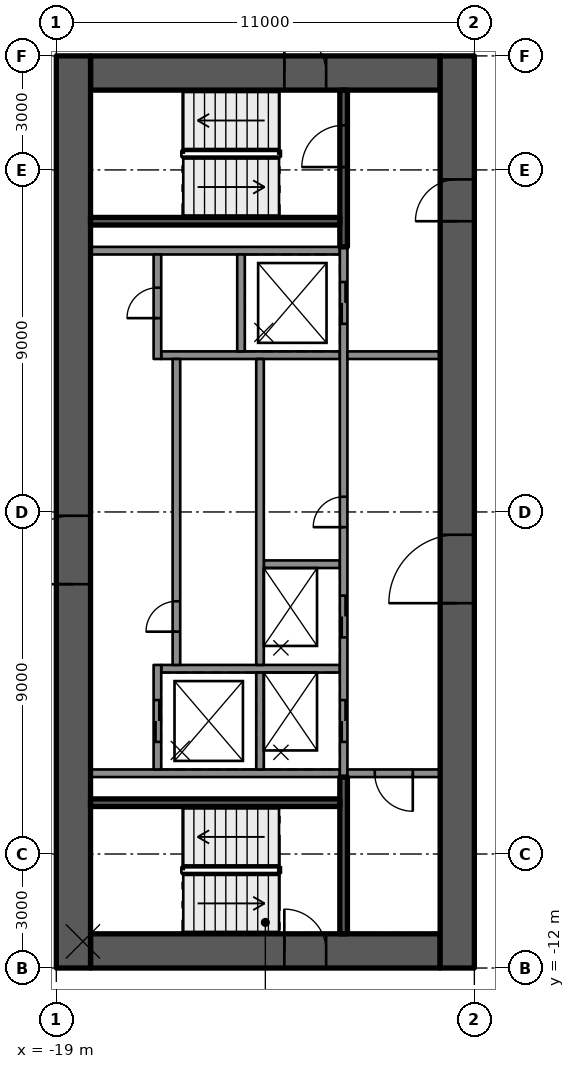
"""IFC4 building model, lengths in metres.
Left out: names, types, materials, properties, quantities, classifications, styles, units other than length and angle.
Written with IfcOpenShell. Run it as: python <this file> out.ifc"""

import sys

from ifc_helpers import new_model, si_unit, direction, frame, frame_2d, origin, place, context, subcontext, project, spatial, rectangle, extrude, element, fill, save


model = new_model("IFC4")
c1 = context("Model", 3, precision=1e-05, world=origin(), true_north=direction((0.0, 1.0)))
c2 = subcontext(c1, "Body", "Model", "MODEL_VIEW")
j1 = project(units=[si_unit("LENGTHUNIT", "METRE"), si_unit("PLANEANGLEUNIT", "RADIAN")], contexts=[c1])
p1 = place(None, origin())
s1 = spatial("IfcSite", under=j1, at=p1, CompositionType="ELEMENT")
p2 = place(p1, origin())
s2 = spatial("IfcBuilding", under=s1, at=p2, CompositionType="ELEMENT")
p3 = place(p2, frame((0.0, 0.0, 292.9)))
s3 = spatial("IfcBuildingStorey", under=s2, at=p3, CompositionType="ELEMENT", Elevation=292.9)
p4 = place(p3, frame((-18.1, 11.55, 0.0), z_axis=(0.0, 0.0, 1.0), x_axis=(1.0, 0.0, 0.0)))
e1 = element("IfcWall", 1, at=p4, inside=s3, PredefinedType="SHEAR", context=c2, shape_type="SweptSolid", body=[
    extrude(rectangle(XDim=9.2, YDim=0.9, at=frame_2d((4.6, 0.0))), origin(), (0.0, 0.0, 1.0), 3.5),
])
p5 = place(p4, frame((5.1, 0.0, 0.0)))
e2 = element("IfcOpeningElement", 2, at=p5, cuts=e1, PredefinedType="OPENING", context=c2, shape_type="SweptSolid", body=[
    extrude(rectangle(XDim=1.1, YDim=2.1, at=frame_2d((0.55, 1.05))), frame((0.0, 0.46, 0.0), z_axis=(0.0, -1.0, 0.0), x_axis=(1.0, 0.0, 0.0)), (0.0, 0.0, 1.0), 0.92),
])
p6 = place(p3, frame((-18.1, -11.55, 0.0), z_axis=(0.0, 0.0, 1.0), x_axis=(1.0, 0.0, 0.0)))
e3 = element("IfcWall", 3, at=p6, inside=s3, PredefinedType="SHEAR", context=c2, shape_type="SweptSolid", body=[
    extrude(rectangle(XDim=9.2, YDim=0.9, at=frame_2d((4.6, 0.0))), origin(), (0.0, 0.0, 1.0), 3.5),
])
p7 = place(p6, frame((5.1, 0.0, 0.0)))
e4 = element("IfcOpeningElement", 4, at=p7, cuts=e3, PredefinedType="OPENING", context=c2, shape_type="SweptSolid", body=[
    extrude(rectangle(XDim=1.1, YDim=2.1, at=frame_2d((0.55, 1.05))), frame((0.0, 0.46, 0.0), z_axis=(0.0, -1.0, 0.0), x_axis=(1.0, 0.0, 0.0)), (0.0, 0.0, 1.0), 0.92),
])
p8 = place(p3, frame((-18.55, -12.0, 0.0), z_axis=(0.0, 0.0, 1.0), x_axis=(0.0, 1.0, 0.0)))
e5 = element("IfcWall", 5, at=p8, inside=s3, PredefinedType="SHEAR", context=c2, shape_type="SweptSolid", body=[
    extrude(rectangle(XDim=24.0, YDim=0.9, at=frame_2d((12.0, 0.0))), origin(), (0.0, 0.0, 1.0), 3.5),
])
p9 = place(p8, frame((10.1, 0.0, 0.0)))
e6 = element("IfcOpeningElement", 6, at=p9, cuts=e5, PredefinedType="OPENING", context=c2, shape_type="SweptSolid", body=[
    extrude(rectangle(XDim=1.8, YDim=2.1, at=frame_2d((0.9, 1.05))), frame((0.0, 0.46, 0.0), z_axis=(0.0, -1.0, 0.0), x_axis=(1.0, 0.0, 0.0)), (0.0, 0.0, 1.0), 0.92),
])
p10 = place(p3, frame((-8.45, -12.0, 0.0), z_axis=(0.0, 0.0, 1.0), x_axis=(0.0, 1.0, 0.0)))
e7 = element("IfcWall", 7, at=p10, inside=s3, PredefinedType="SHEAR", context=c2, shape_type="SweptSolid", body=[
    extrude(rectangle(XDim=24.0, YDim=0.9, at=frame_2d((12.0, 0.0))), origin(), (0.0, 0.0, 1.0), 3.5),
])
p11 = place(p10, frame((9.6, 0.0, 0.0)))
e8 = element("IfcOpeningElement", 8, at=p11, cuts=e7, PredefinedType="OPENING", context=c2, shape_type="SweptSolid", body=[
    extrude(rectangle(XDim=1.8, YDim=2.1, at=frame_2d((0.9, 1.05))), frame((0.0, 0.46, 0.0), z_axis=(0.0, -1.0, 0.0), x_axis=(1.0, 0.0, 0.0)), (0.0, 0.0, 1.0), 0.92),
])
p12 = place(p10, frame((19.65, 0.0, 0.0)))
e9 = element("IfcOpeningElement", 9, at=p12, cuts=e7, PredefinedType="OPENING", context=c2, shape_type="SweptSolid", body=[
    extrude(rectangle(XDim=1.1, YDim=2.1, at=frame_2d((0.55, 1.05))), frame((0.0, 0.46, 0.0), z_axis=(0.0, -1.0, 0.0), x_axis=(1.0, 0.0, 0.0)), (0.0, 0.0, 1.0), 0.92),
])
for number, where, z_axis, x_axis in (
    (10, (-11.54, 6.875, 0.0), (0.0, 0.0, 1.0), (-1.0, 0.0, 0.0)),
    (11, (-11.54, -6.875, 0.0), (0.0, 0.0, 1.0), (-1.0, 0.0, 0.0)),
):
    element("IfcWall", number, at=place(p3, frame(where, z_axis=z_axis, x_axis=x_axis)), inside=s3, PredefinedType="SOLIDWALL", context=c2, shape_type="SweptSolid", body=[
        extrude(rectangle(XDim=6.56, YDim=0.2, at=frame_2d((3.28, 0.0))), origin(), (0.0, 0.0, 1.0), 3.09),
    ])
p13 = place(p3, frame((-11.54, -4.125, 0.0), z_axis=(0.0, 0.0, 1.0), x_axis=(-1.0, 0.0, 0.0)))
e12 = element("IfcWall", 12, at=p13, inside=s3, PredefinedType="SOLIDWALL", context=c2, shape_type="SweptSolid", body=[
    extrude(rectangle(XDim=4.7, YDim=0.2, at=frame_2d((2.35, 0.0))), origin(), (0.0, 0.0, 1.0), 3.09),
])
p14 = place(p3, frame((-11.54, -1.375, 0.0), z_axis=(0.0, 0.0, 1.0), x_axis=(-1.0, 0.0, 0.0)))
e13 = element("IfcWall", 13, at=p14, inside=s3, PredefinedType="SOLIDWALL", context=c2, shape_type="SweptSolid", body=[
    extrude(rectangle(XDim=2.0, YDim=0.2, at=frame_2d((1.0, 0.0))), origin(), (0.0, 0.0, 1.0), 3.09),
])
p15 = place(p3, frame((-11.54, 4.125, 0.0), z_axis=(0.0, 0.0, 1.0), x_axis=(-1.0, 0.0, 0.0)))
e14 = element("IfcWall", 14, at=p15, inside=s3, PredefinedType="SOLIDWALL", context=c2, shape_type="SweptSolid", body=[
    extrude(rectangle(XDim=4.7, YDim=0.2, at=frame_2d((2.35, 0.0))), origin(), (0.0, 0.0, 1.0), 3.09),
])
p16 = place(p3, frame((-11.44, -6.975, 0.0), z_axis=(0.0, 0.0, 1.0), x_axis=(0.0, 1.0, 0.0)))
e15 = element("IfcWall", 15, at=p16, inside=s3, PredefinedType="SOLIDWALL", context=c2, shape_type="SweptSolid", body=[
    extrude(rectangle(XDim=13.95, YDim=0.2, at=frame_2d((6.975, 0.0))), origin(), (0.0, 0.0, 1.0), 3.09),
])
p17 = place(p16, frame((0.925, 0.0, 0.0)))
e16 = element("IfcOpeningElement", 16, at=p17, cuts=e15, PredefinedType="OPENING", context=c2, shape_type="SweptSolid", body=[
    extrude(rectangle(XDim=1.1, YDim=2.1, at=frame_2d((0.55, 1.05))), frame((0.0, 0.11, 0.0), z_axis=(0.0, -1.0, 0.0), x_axis=(1.0, 0.0, 0.0)), (0.0, 0.0, 1.0), 0.22),
])
p18 = place(p16, frame((3.675, 0.0, 0.0)))
e17 = element("IfcOpeningElement", 17, at=p18, cuts=e15, PredefinedType="OPENING", context=c2, shape_type="SweptSolid", body=[
    extrude(rectangle(XDim=1.1, YDim=2.1, at=frame_2d((0.55, 1.05))), frame((0.0, 0.11, 0.0), z_axis=(0.0, -1.0, 0.0), x_axis=(1.0, 0.0, 0.0)), (0.0, 0.0, 1.0), 0.22),
])
p19 = place(p16, frame((11.925, 0.0, 0.0)))
e18 = element("IfcOpeningElement", 18, at=p19, cuts=e15, PredefinedType="OPENING", context=c2, shape_type="SweptSolid", body=[
    extrude(rectangle(XDim=1.1, YDim=2.1, at=frame_2d((0.55, 1.05))), frame((0.0, 0.11, 0.0), z_axis=(0.0, -1.0, 0.0), x_axis=(1.0, 0.0, 0.0)), (0.0, 0.0, 1.0), 0.22),
])
p20 = place(p16, frame((6.575, 0.0, 0.0)))
e19 = element("IfcOpeningElement", 19, at=p20, cuts=e15, PredefinedType="OPENING", context=c2, shape_type="SweptSolid", body=[
    extrude(rectangle(XDim=0.8, YDim=2.1, at=frame_2d((0.4, 1.05))), frame((0.0, 0.11, 0.0), z_axis=(0.0, -1.0, 0.0), x_axis=(1.0, 0.0, 0.0)), (0.0, 0.0, 1.0), 0.22),
])
p21 = place(p3, frame((-13.64, -6.775, 0.0), z_axis=(0.0, 0.0, 1.0), x_axis=(0.0, 1.0, 0.0)))
e20 = element("IfcWall", 20, at=p21, inside=s3, PredefinedType="SOLIDWALL", context=c2, shape_type="SweptSolid", body=[
    extrude(rectangle(XDim=2.55, YDim=0.2, at=frame_2d((1.275, 0.0))), origin(), (0.0, 0.0, 1.0), 3.09),
])
p22 = place(p3, frame((-13.64, -4.025, 0.0), z_axis=(0.0, 0.0, 1.0), x_axis=(0.0, 1.0, 0.0)))
e21 = element("IfcWall", 21, at=p22, inside=s3, PredefinedType="SOLIDWALL", context=c2, shape_type="SweptSolid", body=[
    extrude(rectangle(XDim=8.05, YDim=0.2, at=frame_2d((4.025, 0.0))), origin(), (0.0, 0.0, 1.0), 3.09),
])
p23 = place(p3, frame((-14.14, 4.225, 0.0), z_axis=(0.0, 0.0, 1.0), x_axis=(0.0, 1.0, 0.0)))
e22 = element("IfcWall", 22, at=p23, inside=s3, PredefinedType="SOLIDWALL", context=c2, shape_type="SweptSolid", body=[
    extrude(rectangle(XDim=2.55, YDim=0.2, at=frame_2d((1.275, 0.0))), origin(), (0.0, 0.0, 1.0), 3.09),
])
p24 = place(p3, frame((-16.34, -6.775, 0.0), z_axis=(0.0, 0.0, 1.0), x_axis=(0.0, 1.0, 0.0)))
e23 = element("IfcWall", 23, at=p24, inside=s3, PredefinedType="SOLIDWALL", context=c2, shape_type="SweptSolid", body=[
    extrude(rectangle(XDim=2.75, YDim=0.2, at=frame_2d((1.375, 0.0))), origin(), (0.0, 0.0, 1.0), 3.09),
])
p25 = place(p24, frame((0.725, 0.0, 0.0)))
e24 = element("IfcOpeningElement", 24, at=p25, cuts=e23, PredefinedType="OPENING", context=c2, shape_type="SweptSolid", body=[
    extrude(rectangle(XDim=1.1, YDim=2.1, at=frame_2d((0.55, 1.05))), frame((0.0, 0.11, 0.0), z_axis=(0.0, -1.0, 0.0), x_axis=(1.0, 0.0, 0.0)), (0.0, 0.0, 1.0), 0.22),
])
p26 = place(p3, frame((-15.84, -4.025, 0.0), z_axis=(0.0, 0.0, 1.0), x_axis=(0.0, 1.0, 0.0)))
e25 = element("IfcWall", 25, at=p26, inside=s3, PredefinedType="SOLIDWALL", context=c2, shape_type="SweptSolid", body=[
    extrude(rectangle(XDim=8.05, YDim=0.2, at=frame_2d((4.025, 0.0))), origin(), (0.0, 0.0, 1.0), 3.09),
])
p27 = place(p26, frame((0.875, 0.0, 0.0)))
e26 = element("IfcOpeningElement", 26, at=p27, cuts=e25, PredefinedType="OPENING", context=c2, shape_type="SweptSolid", body=[
    extrude(rectangle(XDim=0.8, YDim=2.1, at=frame_2d((0.4, 1.05))), frame((0.0, 0.11, 0.0), z_axis=(0.0, -1.0, 0.0), x_axis=(1.0, 0.0, 0.0)), (0.0, 0.0, 1.0), 0.22),
])
p28 = place(p3, frame((-16.34, 4.025, 0.0), z_axis=(0.0, 0.0, 1.0), x_axis=(0.0, 1.0, 0.0)))
e27 = element("IfcWall", 27, at=p28, inside=s3, PredefinedType="SOLIDWALL", context=c2, shape_type="SweptSolid", body=[
    extrude(rectangle(XDim=2.75, YDim=0.2, at=frame_2d((1.375, 0.0))), origin(), (0.0, 0.0, 1.0), 3.09),
])
p29 = place(p28, frame((1.075, 0.0, 0.0)))
e28 = element("IfcOpeningElement", 28, at=p29, cuts=e27, PredefinedType="OPENING", context=c2, shape_type="SweptSolid", body=[
    extrude(rectangle(XDim=0.8, YDim=2.1, at=frame_2d((0.4, 1.05))), frame((0.0, 0.11, 0.0), z_axis=(0.0, -1.0, 0.0), x_axis=(1.0, 0.0, 0.0)), (0.0, 0.0, 1.0), 0.22),
])
p30 = place(p3, frame((-11.44, 6.975, 0.0), z_axis=(0.0, 0.0, 1.0), x_axis=(0.0, 1.0, 0.0)))
e29 = element("IfcWall", 29, at=p30, inside=s3, PredefinedType="SOLIDWALL", context=c2, shape_type="SweptSolid", body=[
    extrude(rectangle(XDim=4.125, YDim=0.2, at=frame_2d((2.062, 0.0))), origin(), (0.0, 0.0, 1.0), 3.09),
])
p31 = place(p30, frame((2.1, 0.0, 0.0)))
e30 = element("IfcOpeningElement", 30, at=p31, cuts=e29, PredefinedType="OPENING", context=c2, shape_type="SweptSolid", body=[
    extrude(rectangle(XDim=1.1, YDim=2.1, at=frame_2d((0.55, 1.05))), frame((0.0, 0.11, 0.0), z_axis=(0.0, -1.0, 0.0), x_axis=(1.0, 0.0, 0.0)), (0.0, 0.0, 1.0), 0.22),
])
p32 = place(p3, frame((-11.54, 7.65, 0.0), z_axis=(0.0, 0.0, 1.0), x_axis=(-1.0, 0.0, 0.0)))
e31 = element("IfcWall", 31, at=p32, inside=s3, PredefinedType="SOLIDWALL", context=c2, shape_type="SweptSolid", body=[
    extrude(rectangle(XDim=6.56, YDim=0.2, at=frame_2d((3.28, 0.0))), origin(), (0.0, 0.0, 1.0), 3.09),
])
p33 = place(p3, frame((-11.44, -11.1, 0.0), z_axis=(0.0, 0.0, 1.0), x_axis=(0.0, 1.0, 0.0)))
e32 = element("IfcWall", 32, at=p33, inside=s3, PredefinedType="SOLIDWALL", context=c2, shape_type="SweptSolid", body=[
    extrude(rectangle(XDim=4.125, YDim=0.2, at=frame_2d((2.062, 0.0))), origin(), (0.0, 0.0, 1.0), 3.09),
])
p34 = place(p3, frame((-11.54, -7.65, 0.0), z_axis=(0.0, 0.0, 1.0), x_axis=(-1.0, 0.0, 0.0)))
e33 = element("IfcWall", 33, at=p34, inside=s3, PredefinedType="SOLIDWALL", context=c2, shape_type="SweptSolid", body=[
    extrude(rectangle(XDim=6.56, YDim=0.2, at=frame_2d((3.28, 0.0))), origin(), (0.0, 0.0, 1.0), 3.09),
])
p35 = place(p3, frame((-8.9, 4.125, 0.0), z_axis=(0.0, 0.0, 1.0), x_axis=(-1.0, 0.0, 0.0)))
e34 = element("IfcWall", 34, at=p35, inside=s3, PredefinedType="PARTITIONING", context=c2, shape_type="SweptSolid", body=[
    extrude(rectangle(XDim=2.44, YDim=0.2, at=frame_2d((1.22, 0.0))), origin(), (0.0, 0.0, 1.0), 3.09),
])
p36 = place(p3, frame((-8.9, -6.875, 0.0), z_axis=(0.0, 0.0, 1.0), x_axis=(-1.0, 0.0, 0.0)))
e35 = element("IfcWall", 35, at=p36, inside=s3, PredefinedType="PARTITIONING", context=c2, shape_type="SweptSolid", body=[
    extrude(rectangle(XDim=2.44, YDim=0.2, at=frame_2d((1.22, 0.0))), origin(), (0.0, 0.0, 1.0), 3.09),
])
p37 = place(p36, frame((0.72, 0.0, 0.0)))
e36 = element("IfcOpeningElement", 36, at=p37, cuts=e35, PredefinedType="OPENING", context=c2, shape_type="SweptSolid", body=[
    extrude(rectangle(XDim=1.0, YDim=2.1, at=frame_2d((0.5, 1.05))), frame((0.0, 0.11, 0.0), z_axis=(0.0, -1.0, 0.0), x_axis=(1.0, 0.0, 0.0)), (0.0, 0.0, 1.0), 0.22),
])
p38 = place(p17, origin())
e37 = element("IfcDoor", 37, at=p38, inside=s3, OperationType="DOUBLE_DOOR_SLIDING", PredefinedType="DOOR", context=c2, shape_type="SweptSolid", body=[
    extrude(rectangle(XDim=1.1, YDim=2.1, at=frame_2d((0.55, 1.05))), frame((0.0, 0.025, 0.0), z_axis=(0.0, -1.0, 0.0), x_axis=(1.0, 0.0, 0.0)), (0.0, 0.0, 1.0), 0.05),
])
fill(e16, e37)
p39 = place(p25, origin())
e38 = element("IfcDoor", 38, at=p39, inside=s3, OperationType="DOUBLE_DOOR_SLIDING", PredefinedType="DOOR", context=c2, shape_type="SweptSolid", body=[
    extrude(rectangle(XDim=1.1, YDim=2.1, at=frame_2d((0.55, 1.05))), frame((0.0, 0.025, 0.0), z_axis=(0.0, -1.0, 0.0), x_axis=(1.0, 0.0, 0.0)), (0.0, 0.0, 1.0), 0.05),
])
fill(e24, e38)
p40 = place(p18, origin())
e39 = element("IfcDoor", 39, at=p40, inside=s3, OperationType="DOUBLE_DOOR_SLIDING", PredefinedType="DOOR", context=c2, shape_type="SweptSolid", body=[
    extrude(rectangle(XDim=1.1, YDim=2.1, at=frame_2d((0.55, 1.05))), frame((0.0, 0.025, 0.0), z_axis=(0.0, -1.0, 0.0), x_axis=(1.0, 0.0, 0.0)), (0.0, 0.0, 1.0), 0.05),
])
fill(e17, e39)
p41 = place(p19, origin())
e40 = element("IfcDoor", 40, at=p41, inside=s3, OperationType="DOUBLE_DOOR_SLIDING", PredefinedType="DOOR", context=c2, shape_type="SweptSolid", body=[
    extrude(rectangle(XDim=1.1, YDim=2.1, at=frame_2d((0.55, 1.05))), frame((0.0, 0.025, 0.0), z_axis=(0.0, -1.0, 0.0), x_axis=(1.0, 0.0, 0.0)), (0.0, 0.0, 1.0), 0.05),
])
fill(e18, e40)
p42 = place(p27, origin())
e41 = element("IfcDoor", 41, at=p42, inside=s3, OperationType="SINGLE_SWING_LEFT", PredefinedType="DOOR", context=c2, shape_type="SweptSolid", body=[
    extrude(rectangle(XDim=0.8, YDim=2.1, at=frame_2d((0.4, 1.05))), frame((0.0, 0.025, 0.0), z_axis=(0.0, -1.0, 0.0), x_axis=(1.0, 0.0, 0.0)), (0.0, 0.0, 1.0), 0.05),
])
fill(e26, e41)
p43 = place(p20, origin())
e42 = element("IfcDoor", 42, at=p43, inside=s3, OperationType="SINGLE_SWING_LEFT", PredefinedType="DOOR", context=c2, shape_type="SweptSolid", body=[
    extrude(rectangle(XDim=0.8, YDim=2.1, at=frame_2d((0.4, 1.05))), frame((0.0, 0.025, 0.0), z_axis=(0.0, -1.0, 0.0), x_axis=(1.0, 0.0, 0.0)), (0.0, 0.0, 1.0), 0.05),
])
fill(e19, e42)
p44 = place(p29, origin())
e43 = element("IfcDoor", 43, at=p44, inside=s3, OperationType="SINGLE_SWING_LEFT", PredefinedType="DOOR", context=c2, shape_type="SweptSolid", body=[
    extrude(rectangle(XDim=0.8, YDim=2.1, at=frame_2d((0.4, 1.05))), frame((0.0, 0.025, 0.0), z_axis=(0.0, -1.0, 0.0), x_axis=(1.0, 0.0, 0.0)), (0.0, 0.0, 1.0), 0.05),
])
fill(e28, e43)
p45 = place(p11, origin())
e44 = element("IfcDoor", 44, at=p45, inside=s3, OperationType="SINGLE_SWING_LEFT", PredefinedType="DOOR", context=c2, shape_type="SweptSolid", body=[
    extrude(rectangle(XDim=1.8, YDim=2.1, at=frame_2d((0.9, 1.05))), frame((0.0, 0.025, 0.0), z_axis=(0.0, -1.0, 0.0), x_axis=(1.0, 0.0, 0.0)), (0.0, 0.0, 1.0), 0.05),
])
fill(e8, e44)
p46 = place(p9, origin())
e45 = element("IfcDoor", 45, at=p46, inside=s3, OperationType="SINGLE_SWING_LEFT", PredefinedType="DOOR", context=c2, shape_type="SweptSolid", body=[
    extrude(rectangle(XDim=1.8, YDim=2.1, at=frame_2d((0.9, 1.05))), frame((0.0, 0.025, 0.0), z_axis=(0.0, -1.0, 0.0), x_axis=(1.0, 0.0, 0.0)), (0.0, 0.0, 1.0), 0.05),
])
fill(e6, e45)
p47 = place(p12, origin())
e46 = element("IfcDoor", 46, at=p47, inside=s3, OperationType="SINGLE_SWING_RIGHT", PredefinedType="DOOR", context=c2, shape_type="SweptSolid", body=[
    extrude(rectangle(XDim=1.1, YDim=2.1, at=frame_2d((0.55, 1.05))), frame((0.0, 0.025, 0.0), z_axis=(0.0, -1.0, 0.0), x_axis=(1.0, 0.0, 0.0)), (0.0, 0.0, 1.0), 0.05),
])
fill(e9, e46)
p48 = place(p5, origin())
e47 = element("IfcDoor", 47, at=p48, inside=s3, OperationType="SINGLE_SWING_RIGHT", PredefinedType="DOOR", context=c2, shape_type="SweptSolid", body=[
    extrude(rectangle(XDim=1.1, YDim=2.1, at=frame_2d((0.55, 1.05))), frame((0.0, 0.025, 0.0), z_axis=(0.0, -1.0, 0.0), x_axis=(1.0, 0.0, 0.0)), (0.0, 0.0, 1.0), 0.05),
])
fill(e2, e47)
p49 = place(p7, origin())
e48 = element("IfcDoor", 48, at=p49, inside=s3, OperationType="SINGLE_SWING_RIGHT", PredefinedType="DOOR", context=c2, shape_type="SweptSolid", body=[
    extrude(rectangle(XDim=1.1, YDim=2.1, at=frame_2d((0.55, 1.05))), frame((0.0, 0.025, 0.0), z_axis=(0.0, -1.0, 0.0), x_axis=(1.0, 0.0, 0.0)), (0.0, 0.0, 1.0), 0.05),
])
fill(e4, e48)
p50 = place(p31, origin())
e49 = element("IfcDoor", 49, at=p50, inside=s3, OperationType="SINGLE_SWING_RIGHT", PredefinedType="DOOR", context=c2, shape_type="SweptSolid", body=[
    extrude(rectangle(XDim=1.1, YDim=2.1, at=frame_2d((0.55, 1.05))), frame((0.0, 0.025, 0.0), z_axis=(0.0, -1.0, 0.0), x_axis=(1.0, 0.0, 0.0)), (0.0, 0.0, 1.0), 0.05),
])
fill(e30, e49)
p51 = place(p37, origin())
e50 = element("IfcDoor", 50, at=p51, inside=s3, OperationType="SINGLE_SWING_RIGHT", PredefinedType="DOOR", context=c2, shape_type="SweptSolid", body=[
    extrude(rectangle(XDim=1.0, YDim=2.1, at=frame_2d((0.5, 1.05))), frame((0.0, 0.025, 0.0), z_axis=(0.0, -1.0, 0.0), x_axis=(1.0, 0.0, 0.0)), (0.0, 0.0, 1.0), 0.05),
])
fill(e36, e50)
save(model, sys.argv[1])
